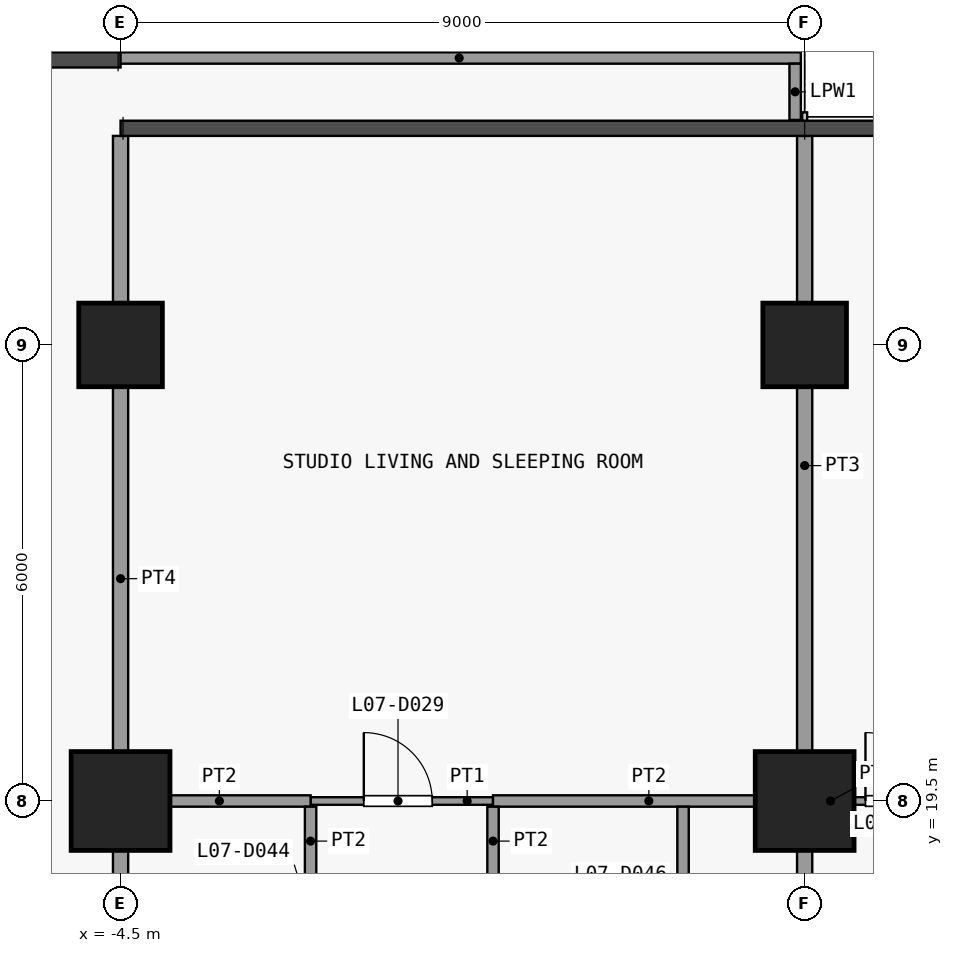
"""IFC4 building model, lengths in metres.
Left out: names, types, materials, properties, quantities, classifications, styles, units other than length and angle.
Written with IfcOpenShell. Run it as: python <this file> out.ifc"""

import sys

from ifc_helpers import new_model, si_unit, direction, frame, frame_2d, origin, origin_2d, place, context, subcontext, project, spatial, rectangle, extrude, element, fill, save


model = new_model("IFC4")
c1 = context("Model", 3, precision=1e-05, world=origin(), true_north=direction((0.0, 1.0)))
c2 = subcontext(c1, "Body", "Model", "MODEL_VIEW")
j1 = project(units=[si_unit("LENGTHUNIT", "METRE"), si_unit("PLANEANGLEUNIT", "RADIAN")], contexts=[c1])
p1 = place(None, origin())
s1 = spatial("IfcSite", under=j1, at=p1, CompositionType="ELEMENT")
p2 = place(p1, origin())
s2 = spatial("IfcBuilding", under=s1, at=p2, CompositionType="ELEMENT")
p3 = place(p2, frame((0.0, 0.0, 36.1)))
s3 = spatial("IfcBuildingStorey", under=s2, at=p3, CompositionType="ELEMENT", Elevation=36.1)
p4 = place(p3, frame((-4.5, 19.5, 0.0), z_axis=(0.0, 0.0, 1.0), x_axis=(1.0, 0.0, 0.0)))
e1 = element("IfcColumn", 1, at=p4, inside=s3, PredefinedType="COLUMN", context=c2, shape_type="SweptSolid", body=[
    extrude(rectangle(XDim=1.3, YDim=1.3, at=origin_2d()), origin(), (0.0, 0.0, 1.0), 3.6),
])
p5 = place(p3, frame((-4.5, 25.5, 0.0), z_axis=(0.0, 0.0, 1.0), x_axis=(1.0, 0.0, 0.0)))
e2 = element("IfcColumn", 2, at=p5, inside=s3, PredefinedType="COLUMN", context=c2, shape_type="SweptSolid", body=[
    extrude(rectangle(XDim=1.1, YDim=1.1, at=origin_2d()), origin(), (0.0, 0.0, 1.0), 3.6),
])
p6 = place(p3, frame((4.5, 19.5, 0.0), z_axis=(0.0, 0.0, 1.0), x_axis=(1.0, 0.0, 0.0)))
e3 = element("IfcColumn", 3, at=p6, inside=s3, PredefinedType="COLUMN", context=c2, shape_type="SweptSolid", body=[
    extrude(rectangle(XDim=1.3, YDim=1.3, at=origin_2d()), origin(), (0.0, 0.0, 1.0), 3.6),
])
p7 = place(p3, frame((4.5, 25.5, 0.0), z_axis=(0.0, 0.0, 1.0), x_axis=(1.0, 0.0, 0.0)))
e4 = element("IfcColumn", 4, at=p7, inside=s3, PredefinedType="COLUMN", context=c2, shape_type="SweptSolid", body=[
    extrude(rectangle(XDim=1.1, YDim=1.1, at=origin_2d()), origin(), (0.0, 0.0, 1.0), 3.6),
])
p8 = place(p3, frame((-4.54, 29.275, 0.0), z_axis=(0.0, 0.0, 1.0), x_axis=(1.0, 0.0, 0.0)))
e5 = element("IfcWall", 5, at=p8, inside=s3, PredefinedType="PARAPET", context=c2, shape_type="SweptSolid", body=[
    extrude(rectangle(XDim=8.99, YDim=0.15, at=frame_2d((4.495, 0.0))), origin(), (0.0, 0.0, 1.0), 1.15),
])
p9 = place(p3, frame((4.375, 29.2, 0.0), z_axis=(0.0, 0.0, 1.0), x_axis=(0.0, -1.0, 0.0)))
e6 = element("IfcWall", 6, at=p9, inside=s3, PredefinedType="PARAPET", context=c2, shape_type="SweptSolid", body=[
    extrude(rectangle(XDim=0.74, YDim=0.15, at=frame_2d((0.37, 0.0))), origin(), (0.0, 0.0, 1.0), 1.15),
])
p10 = place(p3, frame((-2.0, 19.5, 0.0), z_axis=(0.0, 0.0, 1.0), x_axis=(1.0, 0.0, 0.0)))
e7 = element("IfcWall", 7, at=p10, inside=s3, PredefinedType="PARTITIONING", context=c2, shape_type="SweptSolid", body=[
    extrude(rectangle(XDim=2.4, YDim=0.1, at=frame_2d((1.2, 0.0))), origin(), (0.0, 0.0, 1.0), 3.3),
])
p11 = place(p10, frame((0.7, 0.0, 0.0)))
e8 = element("IfcOpeningElement", 8, at=p11, cuts=e7, PredefinedType="OPENING", context=c2, shape_type="SweptSolid", body=[
    extrude(rectangle(XDim=0.9, YDim=2.1, at=frame_2d((0.45, 1.05))), frame((0.0, 0.06, 0.0), z_axis=(0.0, -1.0, 0.0), x_axis=(1.0, 0.0, 0.0)), (0.0, 0.0, 1.0), 0.12),
])
p12 = place(p3, frame((4.5, 19.5, 0.0), z_axis=(0.0, 0.0, 1.0), x_axis=(1.0, 0.0, 0.0)))
e9 = element("IfcWall", 9, at=p12, inside=s3, PredefinedType="PARTITIONING", context=c2, shape_type="SweptSolid", body=[
    extrude(rectangle(XDim=2.4, YDim=0.1, at=frame_2d((1.2, 0.0))), origin(), (0.0, 0.0, 1.0), 3.3),
])
p13 = place(p12, frame((0.8, 0.0, 0.0)))
e10 = element("IfcOpeningElement", 10, at=p13, cuts=e9, PredefinedType="OPENING", context=c2, shape_type="SweptSolid", body=[
    extrude(rectangle(XDim=0.9, YDim=2.1, at=frame_2d((0.45, 1.05))), frame((0.0, 0.06, 0.0), z_axis=(0.0, -1.0, 0.0), x_axis=(1.0, 0.0, 0.0)), (0.0, 0.0, 1.0), 0.12),
])
p14 = place(p3, frame((-4.4, 19.5, 0.0), z_axis=(0.0, 0.0, 1.0), x_axis=(1.0, 0.0, 0.0)))
e11 = element("IfcWall", 11, at=p14, inside=s3, PredefinedType="PARTITIONING", context=c2, shape_type="SweptSolid", body=[
    extrude(rectangle(XDim=2.4, YDim=0.15, at=frame_2d((1.2, 0.0))), origin(), (0.0, 0.0, 1.0), 3.3),
])
p15 = place(p3, frame((0.4, 19.5, 0.0), z_axis=(0.0, 0.0, 1.0), x_axis=(1.0, 0.0, 0.0)))
e12 = element("IfcWall", 12, at=p15, inside=s3, PredefinedType="PARTITIONING", context=c2, shape_type="SweptSolid", body=[
    extrude(rectangle(XDim=4.1, YDim=0.15, at=frame_2d((2.05, 0.0))), origin(), (0.0, 0.0, 1.0), 3.3),
])
p16 = place(p3, frame((-4.5, 16.6, 0.0), z_axis=(0.0, 0.0, 1.0), x_axis=(0.0, 1.0, 0.0)))
e13 = element("IfcWall", 13, at=p16, inside=s3, PredefinedType="PARTITIONING", context=c2, shape_type="SweptSolid", body=[
    extrude(rectangle(XDim=11.65, YDim=0.2, at=frame_2d((5.825, 0.0))), origin(), (0.0, 0.0, 1.0), 3.3),
])
p17 = place(p3, frame((-2.0, 16.6, 0.0), z_axis=(0.0, 0.0, 1.0), x_axis=(0.0, 1.0, 0.0)))
e14 = element("IfcWall", 14, at=p17, inside=s3, PredefinedType="PARTITIONING", context=c2, shape_type="SweptSolid", body=[
    extrude(rectangle(XDim=2.825, YDim=0.15, at=frame_2d((1.413, 0.0))), origin(), (0.0, 0.0, 1.0), 3.3),
])
p18 = place(p17, frame((0.9, 0.0, 0.0)))
e15 = element("IfcOpeningElement", 15, at=p18, cuts=e14, PredefinedType="OPENING", context=c2, shape_type="SweptSolid", body=[
    extrude(rectangle(XDim=0.9, YDim=2.1, at=frame_2d((0.45, 1.05))), frame((0.0, 0.085, 0.0), z_axis=(0.0, -1.0, 0.0), x_axis=(1.0, 0.0, 0.0)), (0.0, 0.0, 1.0), 0.17),
])
p19 = place(p3, frame((0.4, 16.6, 0.0), z_axis=(0.0, 0.0, 1.0), x_axis=(0.0, 1.0, 0.0)))
e16 = element("IfcWall", 16, at=p19, inside=s3, PredefinedType="PARTITIONING", context=c2, shape_type="SweptSolid", body=[
    extrude(rectangle(XDim=2.825, YDim=0.15, at=frame_2d((1.413, 0.0))), origin(), (0.0, 0.0, 1.0), 3.3),
])
p20 = place(p19, frame((0.9, 0.0, 0.0)))
e17 = element("IfcOpeningElement", 17, at=p20, cuts=e16, PredefinedType="OPENING", context=c2, shape_type="SweptSolid", body=[
    extrude(rectangle(XDim=0.9, YDim=2.1, at=frame_2d((0.45, 1.05))), frame((0.0, 0.085, 0.0), z_axis=(0.0, -1.0, 0.0), x_axis=(1.0, 0.0, 0.0)), (0.0, 0.0, 1.0), 0.17),
])
p21 = place(p3, frame((2.9, 16.6, 0.0), z_axis=(0.0, 0.0, 1.0), x_axis=(0.0, 1.0, 0.0)))
e18 = element("IfcWall", 18, at=p21, inside=s3, PredefinedType="PARTITIONING", context=c2, shape_type="SweptSolid", body=[
    extrude(rectangle(XDim=2.825, YDim=0.15, at=frame_2d((1.413, 0.0))), origin(), (0.0, 0.0, 1.0), 3.3),
])
p22 = place(p21, frame((1.0, 0.0, 0.0)))
e19 = element("IfcOpeningElement", 19, at=p22, cuts=e18, PredefinedType="OPENING", context=c2, shape_type="SweptSolid", body=[
    extrude(rectangle(XDim=0.9, YDim=2.1, at=frame_2d((0.45, 1.05))), frame((0.0, 0.085, 0.0), z_axis=(0.0, -1.0, 0.0), x_axis=(1.0, 0.0, 0.0)), (0.0, 0.0, 1.0), 0.17),
])
p23 = place(p3, frame((4.5, 16.6, 0.0), z_axis=(0.0, 0.0, 1.0), x_axis=(0.0, 1.0, 0.0)))
e20 = element("IfcWall", 20, at=p23, inside=s3, PredefinedType="PARTITIONING", context=c2, shape_type="SweptSolid", body=[
    extrude(rectangle(XDim=2.825, YDim=0.2, at=frame_2d((1.413, 0.0))), origin(), (0.0, 0.0, 1.0), 3.3),
])
p24 = place(p3, frame((4.5, 19.575, 0.0), z_axis=(0.0, 0.0, 1.0), x_axis=(0.0, 1.0, 0.0)))
e21 = element("IfcWall", 21, at=p24, inside=s3, PredefinedType="PARTITIONING", context=c2, shape_type="SweptSolid", body=[
    extrude(rectangle(XDim=8.675, YDim=0.2, at=frame_2d((4.337, 0.0))), origin(), (0.0, 0.0, 1.0), 3.3),
])
p25 = place(p11, origin())
e22 = element("IfcDoor", 22, at=p25, inside=s3, OperationType="SINGLE_SWING_RIGHT", PredefinedType="DOOR", context=c2, shape_type="SweptSolid", body=[
    extrude(rectangle(XDim=0.9, YDim=2.1, at=frame_2d((0.45, 1.05))), frame((0.0, 0.025, 0.0), z_axis=(0.0, -1.0, 0.0), x_axis=(1.0, 0.0, 0.0)), (0.0, 0.0, 1.0), 0.05),
])
fill(e8, e22)
p26 = place(p13, origin())
e23 = element("IfcDoor", 23, at=p26, inside=s3, OperationType="SINGLE_SWING_RIGHT", PredefinedType="DOOR", context=c2, shape_type="SweptSolid", body=[
    extrude(rectangle(XDim=0.9, YDim=2.1, at=frame_2d((0.45, 1.05))), frame((0.0, 0.025, 0.0), z_axis=(0.0, -1.0, 0.0), x_axis=(1.0, 0.0, 0.0)), (0.0, 0.0, 1.0), 0.05),
])
fill(e10, e23)
save(model, sys.argv[1])
